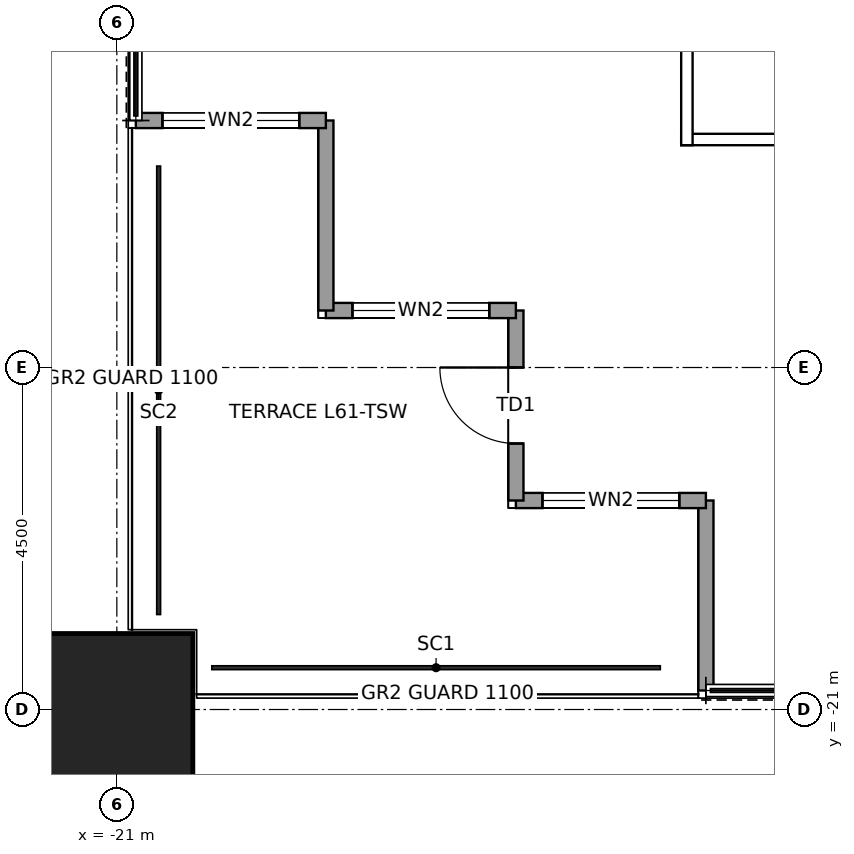
"""IFC4 building model, lengths in metres.
Left out: names, types, materials, properties, quantities, classifications, styles, units other than length and angle.
Written with IfcOpenShell. Run it as: python <this file> out.ifc"""

import sys

from ifc_helpers import new_model, si_unit, direction, frame, frame_2d, origin, origin_2d, place, context, subcontext, project, spatial, rectangle, hollow_rectangle, extrude, element, fill, save


model = new_model("IFC4")
c1 = context("Model", 3, precision=1e-05, world=origin(), true_north=direction((0.0, 1.0)))
c2 = subcontext(c1, "Body", "Model", "MODEL_VIEW")
j1 = project(units=[si_unit("LENGTHUNIT", "METRE"), si_unit("PLANEANGLEUNIT", "RADIAN")], contexts=[c1])
p1 = place(None, origin())
s1 = spatial("IfcSite", under=j1, at=p1, CompositionType="ELEMENT")
p2 = place(p1, origin())
s2 = spatial("IfcBuilding", under=s1, at=p2, CompositionType="ELEMENT")
p3 = place(p2, frame((0.0, 0.0, 279.9)))
s3 = spatial("IfcBuildingStorey", under=s2, at=p3, CompositionType="ELEMENT", Elevation=279.9)
p4 = place(p3, frame((-21.0, -21.0, 0.0), z_axis=(0.0, 0.0, 1.0), x_axis=(1.0, 0.0, 0.0)))
e1 = element("IfcColumn", 1, at=p4, inside=s3, PredefinedType="COLUMN", context=c2, shape_type="SweptSolid", body=[
    extrude(hollow_rectangle(XDim=2.0, YDim=2.0, WallThickness=0.095, at=origin_2d()), origin(), (0.0, 0.0, 1.0), 4.0),
])
p5 = place(p3, frame((-13.25, -20.75, 0.0), z_axis=(0.0, 0.0, 1.0), x_axis=(0.0, 1.0, 0.0)))
e2 = element("IfcWall", 2, at=p5, inside=s3, PredefinedType="SOLIDWALL", context=c2, shape_type="SweptSolid", body=[
    extrude(rectangle(XDim=2.5, YDim=0.2, at=frame_2d((1.25, 0.0))), origin(), (0.0, 0.0, 1.0), 3.85),
])
p6 = place(p3, frame((-13.25, -18.25, 0.0), z_axis=(0.0, 0.0, 1.0), x_axis=(-1.0, 0.0, 0.0)))
e3 = element("IfcWall", 3, at=p6, inside=s3, PredefinedType="SOLIDWALL", context=c2, shape_type="SweptSolid", body=[
    extrude(rectangle(XDim=2.5, YDim=0.2, at=frame_2d((1.25, 0.0))), origin(), (0.0, 0.0, 1.0), 3.85),
])
p7 = place(p6, frame((0.35, 0.0, 0.3)))
e4 = element("IfcOpeningElement", 4, at=p7, cuts=e3, PredefinedType="OPENING", context=c2, shape_type="SweptSolid", body=[
    extrude(rectangle(XDim=1.8, YDim=2.4, at=frame_2d((0.9, 1.2))), frame((0.0, 0.11, 0.0), z_axis=(0.0, -1.0, 0.0), x_axis=(1.0, 0.0, 0.0)), (0.0, 0.0, 1.0), 0.22),
])
p8 = place(p3, frame((-15.75, -18.25, 0.0), z_axis=(0.0, 0.0, 1.0), x_axis=(0.0, 1.0, 0.0)))
e5 = element("IfcWall", 5, at=p8, inside=s3, PredefinedType="SOLIDWALL", context=c2, shape_type="SweptSolid", body=[
    extrude(rectangle(XDim=2.5, YDim=0.2, at=frame_2d((1.25, 0.0))), origin(), (0.0, 0.0, 1.0), 3.317),
])
p9 = place(p8, frame((0.75, 0.0, 0.0)))
e6 = element("IfcOpeningElement", 6, at=p9, cuts=e5, PredefinedType="OPENING", context=c2, shape_type="SweptSolid", body=[
    extrude(rectangle(XDim=1.0, YDim=2.4, at=frame_2d((0.5, 1.2))), frame((0.0, 0.11, 0.0), z_axis=(0.0, -1.0, 0.0), x_axis=(1.0, 0.0, 0.0)), (0.0, 0.0, 1.0), 0.22),
])
p10 = place(p3, frame((-15.75, -15.75, 0.0), z_axis=(0.0, 0.0, 1.0), x_axis=(-1.0, 0.0, 0.0)))
e7 = element("IfcWall", 7, at=p10, inside=s3, PredefinedType="SOLIDWALL", context=c2, shape_type="SweptSolid", body=[
    extrude(rectangle(XDim=2.5, YDim=0.2, at=frame_2d((1.25, 0.0))), origin(), (0.0, 0.0, 1.0), 3.85),
])
p11 = place(p10, frame((0.35, 0.0, 0.3)))
e8 = element("IfcOpeningElement", 8, at=p11, cuts=e7, PredefinedType="OPENING", context=c2, shape_type="SweptSolid", body=[
    extrude(rectangle(XDim=1.8, YDim=2.4, at=frame_2d((0.9, 1.2))), frame((0.0, 0.11, 0.0), z_axis=(0.0, -1.0, 0.0), x_axis=(1.0, 0.0, 0.0)), (0.0, 0.0, 1.0), 0.22),
])
p12 = place(p3, frame((-18.25, -15.75, 0.0), z_axis=(0.0, 0.0, 1.0), x_axis=(0.0, 1.0, 0.0)))
e9 = element("IfcWall", 9, at=p12, inside=s3, PredefinedType="SOLIDWALL", context=c2, shape_type="SweptSolid", body=[
    extrude(rectangle(XDim=2.5, YDim=0.2, at=frame_2d((1.25, 0.0))), origin(), (0.0, 0.0, 1.0), 3.85),
])
p13 = place(p3, frame((-18.25, -13.25, 0.0), z_axis=(0.0, 0.0, 1.0), x_axis=(-1.0, 0.0, 0.0)))
e10 = element("IfcWall", 10, at=p13, inside=s3, PredefinedType="SOLIDWALL", context=c2, shape_type="SweptSolid", body=[
    extrude(rectangle(XDim=2.5, YDim=0.2, at=frame_2d((1.25, 0.0))), origin(), (0.0, 0.0, 1.0), 3.85),
])
p14 = place(p13, frame((0.35, 0.0, 0.3)))
e11 = element("IfcOpeningElement", 11, at=p14, cuts=e10, PredefinedType="OPENING", context=c2, shape_type="SweptSolid", body=[
    extrude(rectangle(XDim=1.8, YDim=2.4, at=frame_2d((0.9, 1.2))), frame((0.0, 0.11, 0.0), z_axis=(0.0, -1.0, 0.0), x_axis=(1.0, 0.0, 0.0)), (0.0, 0.0, 1.0), 0.22),
])
p15 = place(p3, frame((-13.575, -13.5, 0.0), z_axis=(0.0, 0.0, 1.0), x_axis=(1.0, 0.0, 0.0)))
e12 = element("IfcWall", 12, at=p15, inside=s3, PredefinedType="PARTITIONING", context=c2, shape_type="SweptSolid", body=[
    extrude(rectangle(XDim=11.15, YDim=0.15, at=frame_2d((5.575, 0.0))), origin(), (0.0, 0.0, 1.0), 3.85),
])
p16 = place(p15, frame((5.075, 0.0, 0.0)))
e13 = element("IfcOpeningElement", 13, at=p16, cuts=e12, PredefinedType="OPENING", context=c2, shape_type="SweptSolid", body=[
    extrude(rectangle(XDim=1.0, YDim=2.4, at=frame_2d((0.5, 1.2))), frame((0.0, 0.085, 0.0), z_axis=(0.0, -1.0, 0.0), x_axis=(1.0, 0.0, 0.0)), (0.0, 0.0, 1.0), 0.17),
])
p17 = place(p3, frame((-13.5, -13.575, 0.0), z_axis=(0.0, 0.0, 1.0), x_axis=(0.0, 1.0, 0.0)))
e14 = element("IfcWall", 14, at=p17, inside=s3, PredefinedType="PARTITIONING", context=c2, shape_type="SweptSolid", body=[
    extrude(rectangle(XDim=13.65, YDim=0.15, at=frame_2d((6.825, 0.0))), origin(), (0.0, 0.0, 1.0), 3.85),
])
p18 = place(p7, origin())
e15 = element("IfcWindow", 15, at=p18, inside=s3, PartitioningType="SINGLE_PANEL", PredefinedType="WINDOW", context=c2, shape_type="SweptSolid", body=[
    extrude(rectangle(XDim=1.8, YDim=2.4, at=frame_2d((0.9, 1.2))), frame((0.0, 0.03, 0.0), z_axis=(0.0, -1.0, 0.0), x_axis=(1.0, 0.0, 0.0)), (0.0, 0.0, 1.0), 0.06),
])
fill(e4, e15)
p19 = place(p9, origin())
e16 = element("IfcDoor", 16, at=p19, inside=s3, OperationType="SINGLE_SWING_RIGHT", PredefinedType="DOOR", context=c2, shape_type="SweptSolid", body=[
    extrude(rectangle(XDim=1.0, YDim=2.4, at=frame_2d((0.5, 1.2))), frame((0.0, 0.025, 0.0), z_axis=(0.0, -1.0, 0.0), x_axis=(1.0, 0.0, 0.0)), (0.0, 0.0, 1.0), 0.05),
])
fill(e6, e16)
p20 = place(p11, origin())
e17 = element("IfcWindow", 17, at=p20, inside=s3, PartitioningType="SINGLE_PANEL", PredefinedType="WINDOW", context=c2, shape_type="SweptSolid", body=[
    extrude(rectangle(XDim=1.8, YDim=2.4, at=frame_2d((0.9, 1.2))), frame((0.0, 0.03, 0.0), z_axis=(0.0, -1.0, 0.0), x_axis=(1.0, 0.0, 0.0)), (0.0, 0.0, 1.0), 0.06),
])
fill(e8, e17)
p21 = place(p14, origin())
e18 = element("IfcWindow", 18, at=p21, inside=s3, PartitioningType="SINGLE_PANEL", PredefinedType="WINDOW", context=c2, shape_type="SweptSolid", body=[
    extrude(rectangle(XDim=1.8, YDim=2.4, at=frame_2d((0.9, 1.2))), frame((0.0, 0.03, 0.0), z_axis=(0.0, -1.0, 0.0), x_axis=(1.0, 0.0, 0.0)), (0.0, 0.0, 1.0), 0.06),
])
fill(e11, e18)
save(model, sys.argv[1])
